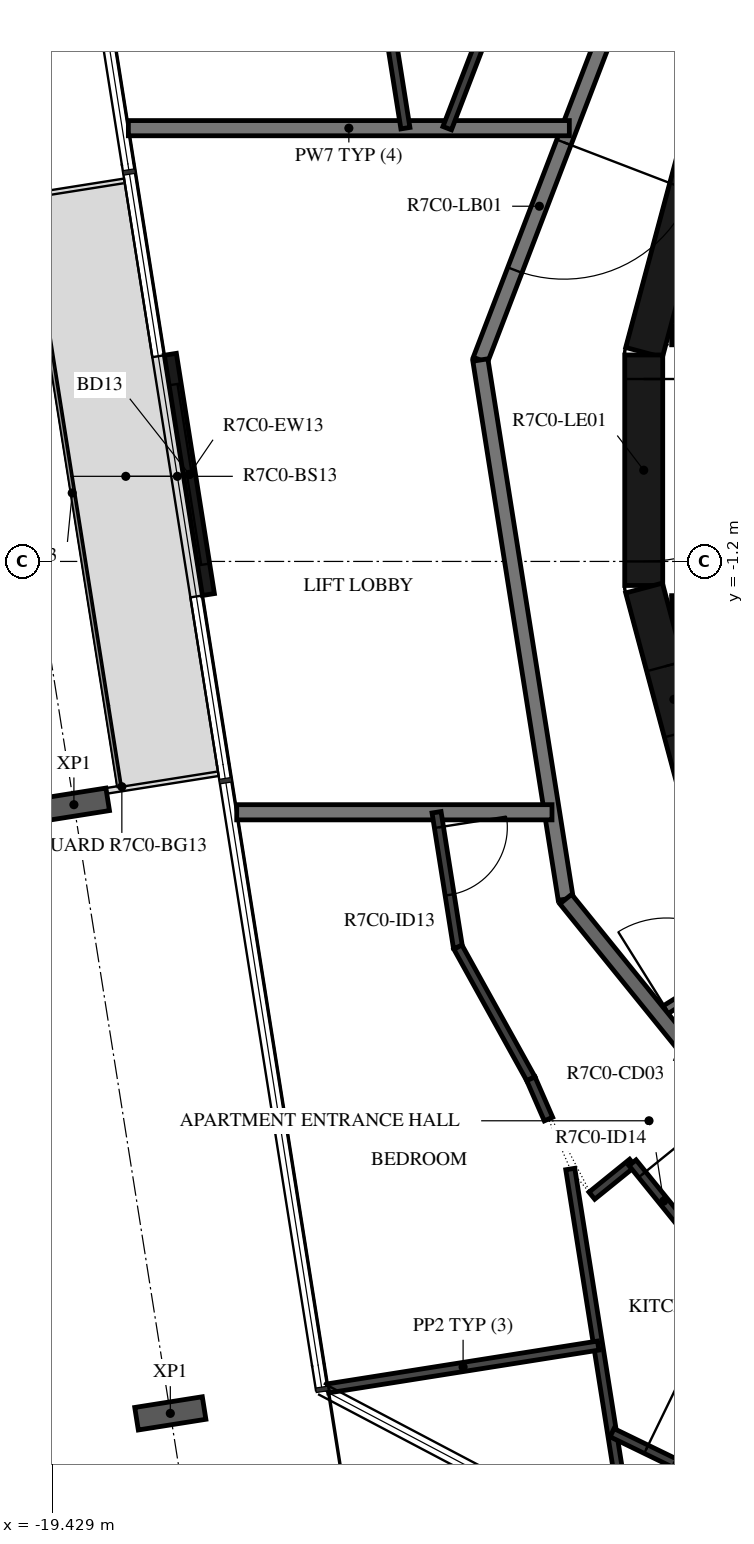
"""IFC4 building model, lengths in metres.
Left out: names, types, materials, properties, quantities, classifications, styles, units other than length and angle.
Written with IfcOpenShell. Run it as: python <this file> out.ifc"""

import sys

from ifc_helpers import new_model, si_unit, direction, frame, frame_2d, origin, origin_2d, place, context, subcontext, project, spatial, rectangle, i_section, extrude, element, fill, save


model = new_model("IFC4")
c1 = context("Model", 3, precision=1e-05, world=origin(), true_north=direction((0.0, 1.0)))
c2 = subcontext(c1, "Body", "Model", "MODEL_VIEW")
j1 = project(units=[si_unit("LENGTHUNIT", "METRE"), si_unit("PLANEANGLEUNIT", "RADIAN")], contexts=[c1])
p1 = place(None, origin())
s1 = spatial("IfcSite", under=j1, at=p1, CompositionType="ELEMENT")
p2 = place(p1, origin())
s2 = spatial("IfcBuilding", under=s1, at=p2, CompositionType="ELEMENT")
p3 = place(p2, frame((0.0, 0.0, 284.4)))
s3 = spatial("IfcBuildingStorey", under=s2, at=p3, CompositionType="ELEMENT", Elevation=284.4)
for number, where, z_axis, x_axis in (
    (1, (-19.144, -4.4, -0.38), (0.0, 0.0, 1.0), (-0.156, 0.988, 0.0)),
    (2, (-17.875, -12.408, -0.38), (0.0, 0.0, 1.0), (-0.156, 0.988, 0.0)),
):
    element("IfcColumn", number, at=place(p3, frame(where, z_axis=z_axis, x_axis=x_axis)), inside=s3, PredefinedType="COLUMN", context=c2, shape_type="SweptSolid", body=[
        extrude(i_section(OverallWidth=0.3, OverallDepth=0.9, WebThickness=0.019, FlangeThickness=0.035, FilletRadius=0.03, at=origin_2d()), origin(), (0.0, 0.0, 1.0), 3.5),
    ])
p4 = place(p3, frame((-17.875, 1.525, 0.0), z_axis=(0.0, 0.0, 1.0), x_axis=(0.156413134305, -0.987691718816, 0.0)))
e3 = element("IfcWall", 3, at=p4, inside=s3, PredefinedType="STANDARD", context=c2, shape_type="SweptSolid", body=[
    extrude(rectangle(XDim=3.2, YDim=0.16, at=frame_2d((1.6, 0.0))), origin(), (0.0, 0.0, 1.0), 3.12),
])
p5 = place(p4, frame((0.4, 0.0, 0.0)))
e4 = element("IfcOpeningElement", 4, at=p5, cuts=e3, PredefinedType="OPENING", context=c2, shape_type="SweptSolid", body=[
    extrude(rectangle(XDim=2.4, YDim=2.4, at=frame_2d((1.2, 1.2))), frame((0.0, 0.09, 0.0), z_axis=(0.0, -1.0, 0.0), x_axis=(1.0, 0.0, 0.0)), (0.0, 0.0, 1.0), 0.18),
])
p6 = place(p3, frame((-10.858, 4.479, 0.0), z_axis=(0.0, 0.0, 1.0), x_axis=(-0.258734743916, -0.965948410781, 0.0)))
e5 = element("IfcWall", 5, at=p6, inside=s3, PredefinedType="SHEAR", context=c2, shape_type="SweptSolid", body=[
    extrude(rectangle(XDim=3.033, YDim=0.5, at=frame_2d((1.516, 0.0))), origin(), (0.0, 0.0, 1.0), 3.12),
])
p7 = place(p3, frame((-11.647, 1.516, 0.0), z_axis=(0.0, 0.0, 1.0), x_axis=(0.0, -1.0, 0.0)))
e6 = element("IfcWall", 6, at=p7, inside=s3, PredefinedType="SHEAR", context=c2, shape_type="SweptSolid", body=[
    extrude(rectangle(XDim=3.033, YDim=0.5, at=frame_2d((1.516, 0.0))), origin(), (0.0, 0.0, 1.0), 3.12),
])
p8 = place(p7, frame((0.316, 0.0, 0.0)))
e7 = element("IfcOpeningElement", 7, at=p8, cuts=e6, PredefinedType="OPENING", context=c2, shape_type="SweptSolid", body=[
    extrude(rectangle(XDim=2.4, YDim=2.1, at=frame_2d((1.2, 1.05))), frame((0.0, 0.26, 0.0), z_axis=(0.0, -1.0, 0.0), x_axis=(1.0, 0.0, 0.0)), (0.0, 0.0, 1.0), 0.52),
])
p9 = place(p3, frame((-11.643, -1.55, 0.0), z_axis=(0.0, 0.0, 1.0), x_axis=(0.258734743916, -0.965948410781, 0.0)))
e8 = element("IfcWall", 8, at=p9, inside=s3, PredefinedType="SHEAR", context=c2, shape_type="SweptSolid", body=[
    extrude(rectangle(XDim=3.033, YDim=0.5, at=frame_2d((1.516, 0.0))), origin(), (0.0, 0.0, 1.0), 3.12),
])
p10 = place(p9, frame((1.066, 0.0, 0.0)))
e9 = element("IfcOpeningElement", 9, at=p10, cuts=e8, PredefinedType="OPENING", context=c2, shape_type="SweptSolid", body=[
    extrude(rectangle(XDim=0.9, YDim=2.1, at=frame_2d((0.45, 1.05))), frame((0.0, 0.26, 0.0), z_axis=(0.0, -1.0, 0.0), x_axis=(1.0, 0.0, 0.0)), (0.0, 0.0, 1.0), 0.52),
])
p11 = place(p3, frame((-11.28, 1.775, 0.0), z_axis=(0.0, 0.0, 1.0), x_axis=(1.0, 0.0, 0.0)))
e10 = element("IfcWall", 10, at=p11, inside=s3, PredefinedType="SHEAR", context=c2, shape_type="SweptSolid", body=[
    extrude(rectangle(XDim=14.38, YDim=0.25, at=frame_2d((7.19, 0.0))), origin(), (0.0, 0.0, 1.0), 3.12),
])
p12 = place(p11, frame((3.305, 0.0, 0.0)))
e11 = element("IfcOpeningElement", 11, at=p12, cuts=e10, PredefinedType="OPENING", context=c2, shape_type="SweptSolid", body=[
    extrude(rectangle(XDim=0.9, YDim=2.1, at=frame_2d((0.45, 1.05))), frame((0.0, 0.135, 0.0), z_axis=(0.0, -1.0, 0.0), x_axis=(1.0, 0.0, 0.0)), (0.0, 0.0, 1.0), 0.27),
])
p13 = place(p11, frame((9.755, 0.0, 0.0)))
e12 = element("IfcOpeningElement", 12, at=p13, cuts=e10, PredefinedType="OPENING", context=c2, shape_type="SweptSolid", body=[
    extrude(rectangle(XDim=0.9, YDim=2.1, at=frame_2d((0.45, 1.05))), frame((0.0, 0.135, 0.0), z_axis=(0.0, -1.0, 0.0), x_axis=(1.0, 0.0, 0.0)), (0.0, 0.0, 1.0), 0.27),
])
p14 = place(p3, frame((-11.28, -1.775, 0.0), z_axis=(0.0, 0.0, 1.0), x_axis=(1.0, 0.0, 0.0)))
e13 = element("IfcWall", 13, at=p14, inside=s3, PredefinedType="SHEAR", context=c2, shape_type="SweptSolid", body=[
    extrude(rectangle(XDim=14.38, YDim=0.25, at=frame_2d((7.19, 0.0))), origin(), (0.0, 0.0, 1.0), 3.12),
])
p15 = place(p14, frame((6.43, 0.0, 0.0)))
e14 = element("IfcOpeningElement", 14, at=p15, cuts=e13, PredefinedType="OPENING", context=c2, shape_type="SweptSolid", body=[
    extrude(rectangle(XDim=1.1, YDim=2.1, at=frame_2d((0.55, 1.05))), frame((0.0, 0.135, 0.0), z_axis=(0.0, -1.0, 0.0), x_axis=(1.0, 0.0, 0.0)), (0.0, 0.0, 1.0), 0.27),
])
p16 = place(p14, frame((8.58, 0.0, 0.0)))
e15 = element("IfcOpeningElement", 15, at=p16, cuts=e13, PredefinedType="OPENING", context=c2, shape_type="SweptSolid", body=[
    extrude(rectangle(XDim=1.1, YDim=2.1, at=frame_2d((0.55, 1.05))), frame((0.0, 0.135, 0.0), z_axis=(0.0, -1.0, 0.0), x_axis=(1.0, 0.0, 0.0)), (0.0, 0.0, 1.0), 0.27),
])
p17 = place(p14, frame((10.73, 0.0, 0.0)))
e16 = element("IfcOpeningElement", 16, at=p17, cuts=e13, PredefinedType="OPENING", context=c2, shape_type="SweptSolid", body=[
    extrude(rectangle(XDim=1.1, YDim=2.1, at=frame_2d((0.55, 1.05))), frame((0.0, 0.135, 0.0), z_axis=(0.0, -1.0, 0.0), x_axis=(1.0, 0.0, 0.0)), (0.0, 0.0, 1.0), 0.27),
])
p18 = place(p14, frame((3.305, 0.0, 0.0)))
e17 = element("IfcOpeningElement", 17, at=p18, cuts=e13, PredefinedType="OPENING", context=c2, shape_type="SweptSolid", body=[
    extrude(rectangle(XDim=0.9, YDim=2.1, at=frame_2d((0.45, 1.05))), frame((0.0, 0.135, 0.0), z_axis=(0.0, -1.0, 0.0), x_axis=(1.0, 0.0, 0.0)), (0.0, 0.0, 1.0), 0.27),
])
p19 = place(p14, frame((12.98, 0.0, 0.0)))
e18 = element("IfcOpeningElement", 18, at=p19, cuts=e13, PredefinedType="OPENING", context=c2, shape_type="SweptSolid", body=[
    extrude(rectangle(XDim=0.9, YDim=2.1, at=frame_2d((0.45, 1.05))), frame((0.0, 0.135, 0.0), z_axis=(0.0, -1.0, 0.0), x_axis=(1.0, 0.0, 0.0)), (0.0, 0.0, 1.0), 0.27),
])
p20 = place(p3, frame((-11.449, -7.154, 0.0), z_axis=(0.0, 0.0, 1.0), x_axis=(0.848067047543, 0.529888934468, 0.0)))
e19 = element("IfcWall", 19, at=p20, inside=s3, PredefinedType="PARTITIONING", context=c2, shape_type="SweptSolid", body=[
    extrude(rectangle(XDim=1.596, YDim=0.12, at=frame_2d((0.798, 0.0))), origin(), (0.0, 0.0, 1.0), 3.12),
])
p21 = place(p20, frame((0.12, 0.0, 0.0)))
e20 = element("IfcOpeningElement", 20, at=p21, cuts=e19, PredefinedType="OPENING", context=c2, shape_type="SweptSolid", body=[
    extrude(rectangle(XDim=1.2, YDim=2.1, at=frame_2d((0.6, 1.05))), frame((0.0, 0.07, 0.0), z_axis=(0.0, -1.0, 0.0), x_axis=(1.0, 0.0, 0.0)), (0.0, 0.0, 1.0), 0.14),
])
p22 = place(p3, frame((-11.223, 8.154, 0.0), z_axis=(0.0, 0.0, 1.0), x_axis=(-0.358341090983, -0.93359073609, 0.0)))
e21 = element("IfcWall", 21, at=p22, inside=s3, PredefinedType="STANDARD", context=c2, shape_type="SweptSolid", body=[
    extrude(rectangle(XDim=7.181, YDim=0.2, at=frame_2d((3.59, 0.0))), origin(), (0.0, 0.0, 1.0), 3.12),
])
p23 = place(p22, frame((4.114, 0.0, 0.0)))
e22 = element("IfcOpeningElement", 22, at=p23, cuts=e21, PredefinedType="OPENING", context=c2, shape_type="SweptSolid", body=[
    extrude(rectangle(XDim=1.8, YDim=2.1, at=frame_2d((0.9, 1.05))), frame((0.0, 0.11, 0.0), z_axis=(0.0, -1.0, 0.0), x_axis=(1.0, 0.0, 0.0)), (0.0, 0.0, 1.0), 0.22),
])
p24 = place(p3, frame((-13.797, 1.45, 0.0), z_axis=(0.0, 0.0, 1.0), x_axis=(0.156421704315, -0.987690361611, 0.0)))
e23 = element("IfcWall", 23, at=p24, inside=s3, PredefinedType="STANDARD", context=c2, shape_type="SweptSolid", body=[
    extrude(rectangle(XDim=7.181, YDim=0.2, at=frame_2d((3.591, 0.0))), origin(), (0.0, 0.0, 1.0), 3.12),
])
p25 = place(p3, frame((-12.673, -5.643, 0.0), z_axis=(0.0, 0.0, 1.0), x_axis=(0.629302871585, -0.777160148113, 0.0)))
e24 = element("IfcWall", 24, at=p25, inside=s3, PredefinedType="STANDARD", context=c2, shape_type="SweptSolid", body=[
    extrude(rectangle(XDim=7.181, YDim=0.2, at=frame_2d((3.59, 0.0))), origin(), (0.0, 0.0, 1.0), 3.12),
])
p26 = place(p3, frame((-12.626, 4.5, 0.0), z_axis=(0.0, 0.0, 1.0), x_axis=(-1.0, 0.0, 0.0)))
e25 = element("IfcWall", 25, at=p26, inside=s3, PredefinedType="STANDARD", context=c2, shape_type="SweptSolid", body=[
    extrude(rectangle(XDim=5.802, YDim=0.2, at=frame_2d((2.901, 0.0))), origin(), (0.0, 0.0, 1.0), 3.12),
])
p27 = place(p3, frame((-17.002, -4.5, 0.0), z_axis=(0.0, 0.0, 1.0), x_axis=(1.0, 0.0, 0.0)))
e26 = element("IfcWall", 26, at=p27, inside=s3, PredefinedType="STANDARD", context=c2, shape_type="SweptSolid", body=[
    extrude(rectangle(XDim=4.148, YDim=0.2, at=frame_2d((2.074, 0.0))), origin(), (0.0, 0.0, 1.0), 3.12),
])
p28 = place(p3, frame((-12.479, 9.067, 0.0), z_axis=(0.0, 0.0, 1.0), x_axis=(-0.358387060848, -0.933573090131, 0.0)))
e27 = element("IfcWall", 27, at=p28, inside=s3, PredefinedType="PARTITIONING", context=c2, shape_type="SweptSolid", body=[
    extrude(rectangle(XDim=4.892, YDim=0.12, at=frame_2d((2.446, 0.0))), origin(), (0.0, 0.0, 1.0), 3.12),
])
p29 = place(p3, frame((-16.266, 13.865, 0.0), z_axis=(0.0, 0.0, 1.0), x_axis=(0.156422690833, -0.987690205374, 0.0)))
e28 = element("IfcWall", 28, at=p29, inside=s3, PredefinedType="PARTITIONING", context=c2, shape_type="SweptSolid", body=[
    extrude(rectangle(XDim=9.482, YDim=0.12, at=frame_2d((4.741, 0.0))), origin(), (0.0, 0.0, 1.0), 3.12),
])
p30 = place(p29, frame((3.357, 0.0, 0.0)))
e29 = element("IfcOpeningElement", 29, at=p30, cuts=e28, PredefinedType="OPENING", context=c2, shape_type="SweptSolid", body=[
    extrude(rectangle(XDim=0.9, YDim=2.1, at=frame_2d((0.45, 1.05))), frame((0.0, 0.07, 0.0), z_axis=(0.0, -1.0, 0.0), x_axis=(1.0, 0.0, 0.0)), (0.0, 0.0, 1.0), 0.14),
])
p31 = place(p3, frame((-14.373, -4.5, 0.0), z_axis=(0.0, 0.0, 1.0), x_axis=(0.156437152886, -0.987687914878, 0.0)))
e30 = element("IfcWall", 30, at=p31, inside=s3, PredefinedType="PARTITIONING", context=c2, shape_type="SweptSolid", body=[
    extrude(rectangle(XDim=1.796, YDim=0.12, at=frame_2d((0.898, 0.0))), origin(), (0.0, 0.0, 1.0), 3.12),
])
p32 = place(p31, frame((0.2, 0.0, 0.0)))
e31 = element("IfcOpeningElement", 31, at=p32, cuts=e30, PredefinedType="OPENING", context=c2, shape_type="SweptSolid", body=[
    extrude(rectangle(XDim=0.9, YDim=2.1, at=frame_2d((0.45, 1.05))), frame((0.0, 0.07, 0.0), z_axis=(0.0, -1.0, 0.0), x_axis=(1.0, 0.0, 0.0)), (0.0, 0.0, 1.0), 0.14),
])
p33 = place(p3, frame((-14.092, -6.274, 0.0), z_axis=(0.0, 0.0, 1.0), x_axis=(0.484732033151, -0.87466270987, 0.0)))
e32 = element("IfcWall", 32, at=p33, inside=s3, PredefinedType="PARTITIONING", context=c2, shape_type="SweptSolid", body=[
    extrude(rectangle(XDim=1.98, YDim=0.12, at=frame_2d((0.99, 0.0))), origin(), (0.0, 0.0, 1.0), 3.12),
])
p34 = place(p3, frame((-13.132, -8.006, 0.0), z_axis=(0.0, 0.0, 1.0), x_axis=(0.400176548656, -0.916438066596, 0.0)))
e33 = element("IfcWall", 33, at=p34, inside=s3, PredefinedType="PARTITIONING", context=c2, shape_type="SweptSolid", body=[
    extrude(rectangle(XDim=0.578, YDim=0.12, at=frame_2d((0.289, 0.0))), origin(), (0.0, 0.0, 1.0), 3.12),
])
p35 = place(p3, frame((-12.33, -9.544, 0.0), z_axis=(0.0, 0.0, 1.0), x_axis=(0.777046524115, 0.629443166109, 0.0)))
e34 = element("IfcWall", 34, at=p35, inside=s3, PredefinedType="PARTITIONING", context=c2, shape_type="SweptSolid", body=[
    extrude(rectangle(XDim=0.688, YDim=0.12, at=frame_2d((0.344, 0.0))), origin(), (0.0, 0.0, 1.0), 3.12),
])
p36 = place(p3, frame((-11.795, -9.111, 0.0), z_axis=(0.0, 0.0, 1.0), x_axis=(0.62936834401, -0.777107127466, 0.0)))
e35 = element("IfcWall", 35, at=p36, inside=s3, PredefinedType="PARTITIONING", context=c2, shape_type="SweptSolid", body=[
    extrude(rectangle(XDim=4.334, YDim=0.12, at=frame_2d((2.167, 0.0))), origin(), (0.0, 0.0, 1.0), 3.12),
])
p37 = place(p36, frame((0.2, 0.0, 0.0)))
e36 = element("IfcOpeningElement", 36, at=p37, cuts=e35, PredefinedType="OPENING", context=c2, shape_type="SweptSolid", body=[
    extrude(rectangle(XDim=0.9, YDim=2.1, at=frame_2d((0.45, 1.05))), frame((0.0, 0.07, 0.0), z_axis=(0.0, -1.0, 0.0), x_axis=(1.0, 0.0, 0.0)), (0.0, 0.0, 1.0), 0.14),
])
p38 = place(p3, frame((-11.185, -18.213, 0.0), z_axis=(0.0, 0.0, 1.0), x_axis=(-0.15642108221, 0.987690460134, 0.0)))
e37 = element("IfcWall", 37, at=p38, inside=s3, PredefinedType="PARTITIONING", context=c2, shape_type="SweptSolid", body=[
    extrude(rectangle(XDim=9.132, YDim=0.12, at=frame_2d((4.566, 0.0))), origin(), (0.0, 0.0, 1.0), 3.12),
])
p39 = place(p38, frame((1.781, 0.0, 0.0)))
e38 = element("IfcOpeningElement", 38, at=p39, cuts=e37, PredefinedType="OPENING", context=c2, shape_type="SweptSolid", body=[
    extrude(rectangle(XDim=0.9, YDim=2.1, at=frame_2d((0.45, 1.05))), frame((0.0, 0.07, 0.0), z_axis=(0.0, -1.0, 0.0), x_axis=(1.0, 0.0, 0.0)), (0.0, 0.0, 1.0), 0.14),
])
p40 = place(p3, frame((-15.802, -12.08, 0.0), z_axis=(0.0, 0.0, 1.0), x_axis=(0.987685312069, 0.156453585206, 0.0)))
e39 = element("IfcWall", 39, at=p40, inside=s3, PredefinedType="PARTITIONING", context=c2, shape_type="SweptSolid", body=[
    extrude(rectangle(XDim=3.6, YDim=0.12, at=frame_2d((1.8, 0.0))), origin(), (0.0, 0.0, 1.0), 2.73),
])
p41 = place(p3, frame((-12.064, -12.662, 0.0), z_axis=(0.0, 0.0, 1.0), x_axis=(0.899383852228, -0.437159794985, 0.0)))
e40 = element("IfcWall", 40, at=p41, inside=s3, PredefinedType="PARTITIONING", context=c2, shape_type="SweptSolid", body=[
    extrude(rectangle(XDim=6.75, YDim=0.12, at=frame_2d((3.375, 0.0))), origin(), (0.0, 0.0, 1.0), 3.12),
])
p42 = place(p41, frame((0.5, 0.0, 0.0)))
e41 = element("IfcOpeningElement", 41, at=p42, cuts=e40, PredefinedType="OPENING", context=c2, shape_type="SweptSolid", body=[
    extrude(rectangle(XDim=0.9, YDim=2.1, at=frame_2d((0.45, 1.05))), frame((0.0, 0.07, 0.0), z_axis=(0.0, -1.0, 0.0), x_axis=(1.0, 0.0, 0.0)), (0.0, 0.0, 1.0), 0.14),
])
p43 = place(p5, origin())
e42 = element("IfcDoor", 42, at=p43, inside=s3, OperationType="DOUBLE_DOOR_SLIDING", PredefinedType="DOOR", context=c2, shape_type="SweptSolid", body=[
    extrude(rectangle(XDim=2.4, YDim=2.4, at=frame_2d((1.2, 1.2))), frame((0.0, 0.025, 0.0), z_axis=(0.0, -1.0, 0.0), x_axis=(1.0, 0.0, 0.0)), (0.0, 0.0, 1.0), 0.05),
])
fill(e4, e42)
p44 = place(p8, origin())
e43 = element("IfcDoor", 43, at=p44, inside=s3, OperationType="DOUBLE_DOOR_SINGLE_SWING", PredefinedType="DOOR", context=c2, shape_type="SweptSolid", body=[
    extrude(rectangle(XDim=2.4, YDim=2.1, at=frame_2d((1.2, 1.05))), frame((0.0, 0.025, 0.0), z_axis=(0.0, -1.0, 0.0), x_axis=(1.0, 0.0, 0.0)), (0.0, 0.0, 1.0), 0.05),
])
fill(e7, e43)
p45 = place(p10, origin())
e44 = element("IfcDoor", 44, at=p45, inside=s3, OperationType="SINGLE_SWING_RIGHT", PredefinedType="DOOR", context=c2, shape_type="SweptSolid", body=[
    extrude(rectangle(XDim=0.9, YDim=2.1, at=frame_2d((0.45, 1.05))), frame((0.0, 0.025, 0.0), z_axis=(0.0, -1.0, 0.0), x_axis=(1.0, 0.0, 0.0)), (0.0, 0.0, 1.0), 0.05),
])
fill(e9, e44)
p46 = place(p32, origin())
e45 = element("IfcDoor", 45, at=p46, inside=s3, OperationType="SINGLE_SWING_RIGHT", PredefinedType="DOOR", context=c2, shape_type="SweptSolid", body=[
    extrude(rectangle(XDim=0.9, YDim=2.1, at=frame_2d((0.45, 1.05))), frame((0.0, 0.025, 0.0), z_axis=(0.0, -1.0, 0.0), x_axis=(1.0, 0.0, 0.0)), (0.0, 0.0, 1.0), 0.05),
])
fill(e31, e45)
p47 = place(p37, origin())
e46 = element("IfcDoor", 46, at=p47, inside=s3, OperationType="SINGLE_SWING_RIGHT", PredefinedType="DOOR", context=c2, shape_type="SweptSolid", body=[
    extrude(rectangle(XDim=0.9, YDim=2.1, at=frame_2d((0.45, 1.05))), frame((0.0, 0.025, 0.0), z_axis=(0.0, -1.0, 0.0), x_axis=(1.0, 0.0, 0.0)), (0.0, 0.0, 1.0), 0.05),
])
fill(e36, e46)
p48 = place(p42, origin())
e47 = element("IfcDoor", 47, at=p48, inside=s3, OperationType="SINGLE_SWING_RIGHT", PredefinedType="DOOR", context=c2, shape_type="SweptSolid", body=[
    extrude(rectangle(XDim=0.9, YDim=2.1, at=frame_2d((0.45, 1.05))), frame((0.0, 0.025, 0.0), z_axis=(0.0, -1.0, 0.0), x_axis=(1.0, 0.0, 0.0)), (0.0, 0.0, 1.0), 0.05),
])
fill(e41, e47)
p49 = place(p21, origin())
e48 = element("IfcDoor", 48, at=p49, inside=s3, OperationType="DOUBLE_DOOR_SINGLE_SWING", PredefinedType="DOOR", context=c2, shape_type="SweptSolid", body=[
    extrude(rectangle(XDim=1.2, YDim=2.1, at=frame_2d((0.6, 1.05))), frame((0.0, 0.025, 0.0), z_axis=(0.0, -1.0, 0.0), x_axis=(1.0, 0.0, 0.0)), (0.0, 0.0, 1.0), 0.05),
])
fill(e20, e48)
p50 = place(p23, origin())
e49 = element("IfcDoor", 49, at=p50, inside=s3, OperationType="DOUBLE_DOOR_SINGLE_SWING", PredefinedType="DOOR", context=c2, shape_type="SweptSolid", body=[
    extrude(rectangle(XDim=1.8, YDim=2.1, at=frame_2d((0.9, 1.05))), frame((0.0, 0.025, 0.0), z_axis=(0.0, -1.0, 0.0), x_axis=(1.0, 0.0, 0.0)), (0.0, 0.0, 1.0), 0.05),
])
fill(e22, e49)
save(model, sys.argv[1])
